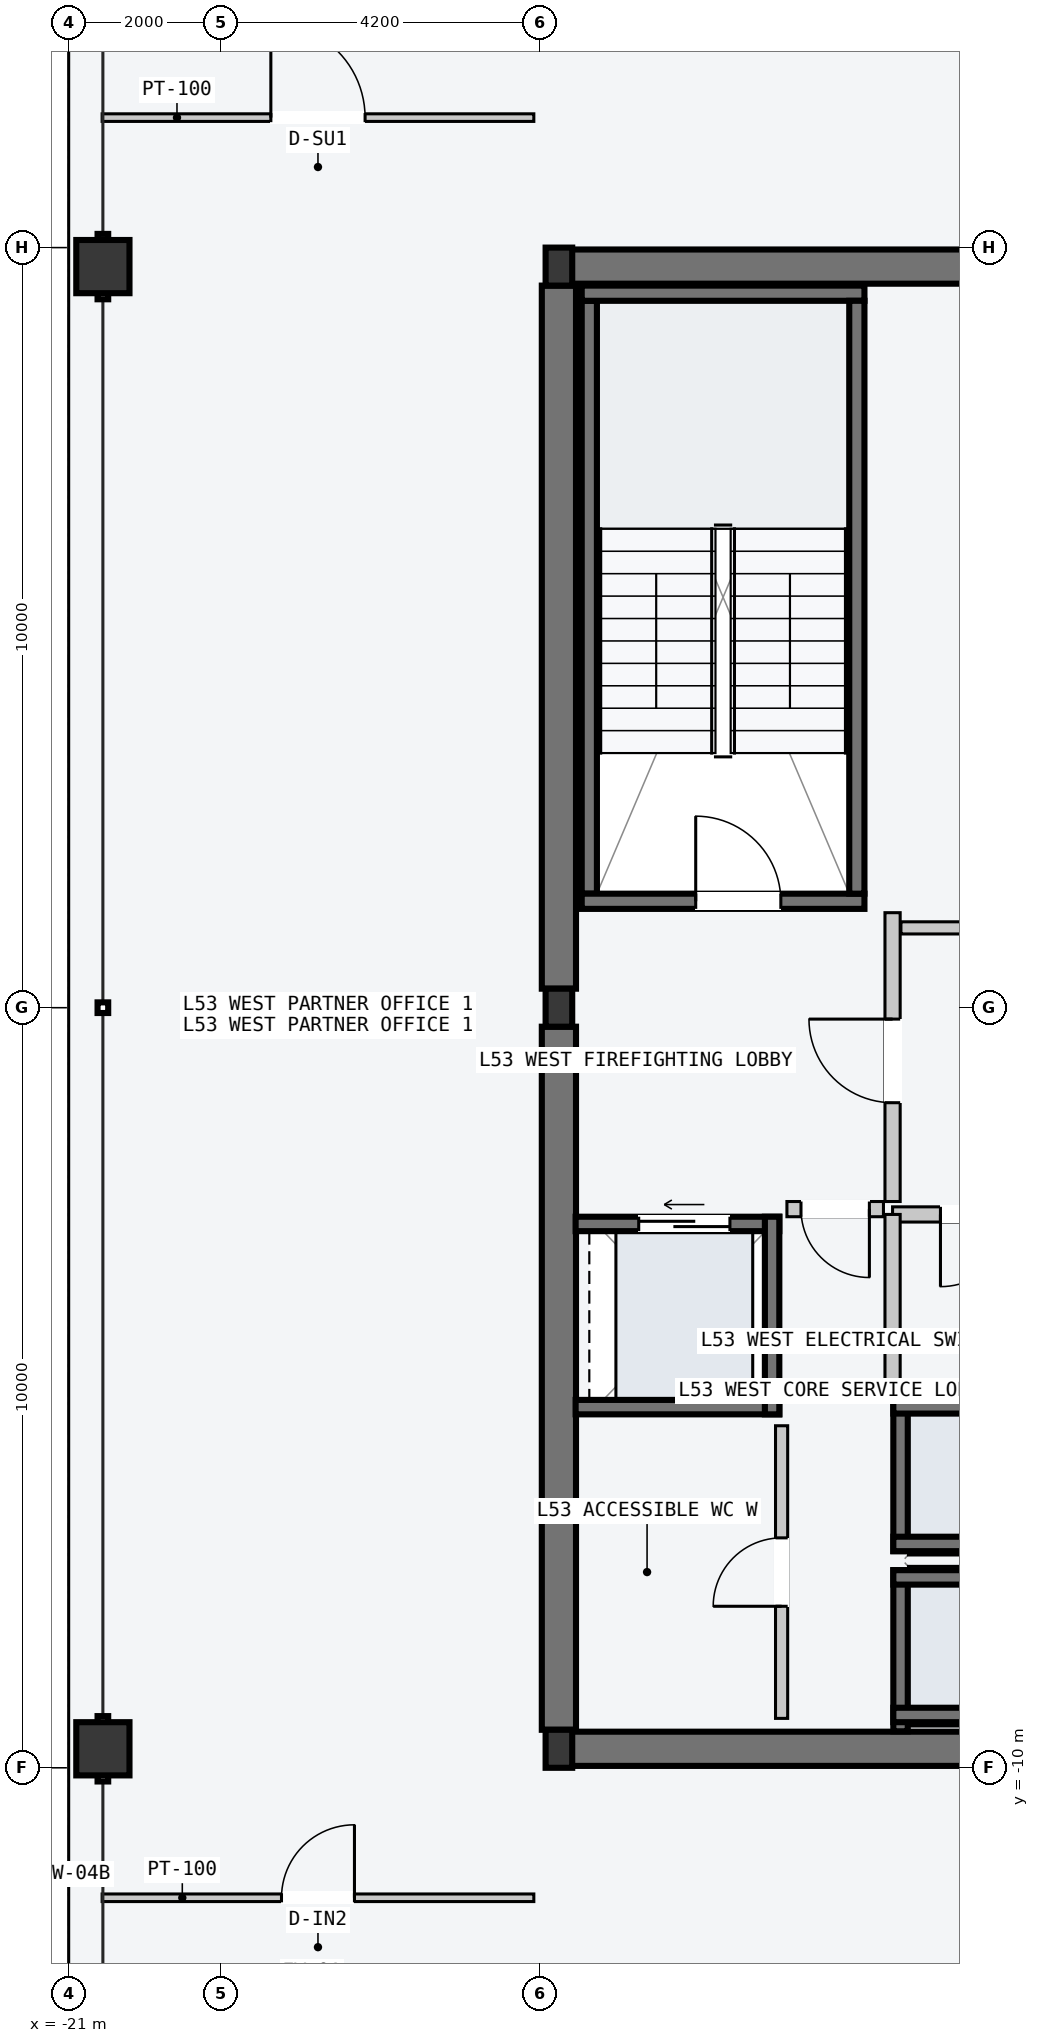
"""IFC4 building model, lengths in metres.
Left out: names, types, materials, properties, quantities, classifications, styles, units other than length and angle.
Written with IfcOpenShell. Run it as: python <this file> out.ifc"""

import sys

from ifc_helpers import new_model, si_unit, direction, frame, frame_2d, origin, origin_2d, place, context, subcontext, project, spatial, rectangle, hollow_rectangle, i_section, extrude, element, fill, save


model = new_model("IFC4")
c1 = context("Model", 3, precision=1e-05, world=origin(), true_north=direction((0.0, 1.0)))
c2 = subcontext(c1, "Body", "Model", "MODEL_VIEW")
j1 = project(units=[si_unit("LENGTHUNIT", "METRE"), si_unit("PLANEANGLEUNIT", "RADIAN")], contexts=[c1])
p1 = place(None, origin())
s1 = spatial("IfcSite", under=j1, at=p1, CompositionType="ELEMENT")
p2 = place(p1, origin())
s2 = spatial("IfcBuilding", under=s1, at=p2, CompositionType="ELEMENT")
p3 = place(p2, frame((0.0, 0.0, 201.9)))
s3 = spatial("IfcBuildingStorey", under=s2, at=p3, CompositionType="ELEMENT", Elevation=201.9)
for number, where, z_axis, x_axis in (
    (1, (-14.53, -9.75, -0.2), (0.0, 0.0, 1.0), (1.0, 0.0, 0.0)),
    (2, (-14.53, 9.75, -0.2), (0.0, 0.0, 1.0), (1.0, 0.0, 0.0)),
):
    element("IfcWall", number, at=place(p3, frame(where, z_axis=z_axis, x_axis=x_axis)), inside=s3, PredefinedType="SHEAR", context=c2, shape_type="SweptSolid", body=[
        extrude(rectangle(XDim=6.46, YDim=0.45, at=frame_2d((3.23, 0.0))), origin(), (0.0, 0.0, 1.0), 3.6),
    ])
for number, where, z_axis, x_axis in (
    (3, (-14.55, -9.5, -0.2), (0.0, 0.0, 1.0), (0.0, 1.0, 0.0)),
    (4, (-14.55, 0.25, -0.2), (0.0, 0.0, 1.0), (0.0, 1.0, 0.0)),
):
    element("IfcWall", number, at=place(p3, frame(where, z_axis=z_axis, x_axis=x_axis)), inside=s3, PredefinedType="SHEAR", context=c2, shape_type="SweptSolid", body=[
        extrude(rectangle(XDim=9.25, YDim=0.45, at=frame_2d((4.625, 0.0))), origin(), (0.0, 0.0, 1.0), 3.6),
    ])
p4 = place(p3, frame((-14.15, 1.5, -0.2), z_axis=(0.0, 0.0, 1.0), x_axis=(0.0, 1.0, 0.0)))
e5 = element("IfcWall", 5, at=p4, inside=s3, PredefinedType="SOLIDWALL", context=c2, shape_type="SweptSolid", body=[
    extrude(rectangle(XDim=7.8, YDim=0.2, at=frame_2d((3.9, 0.0))), origin(), (0.0, 0.0, 1.0), 3.6),
])
p5 = place(p3, frame((-14.25, 1.4, -0.2), z_axis=(0.0, 0.0, 1.0), x_axis=(1.0, 0.0, 0.0)))
e6 = element("IfcWall", 6, at=p5, inside=s3, PredefinedType="SOLIDWALL", context=c2, shape_type="SweptSolid", body=[
    extrude(rectangle(XDim=3.72, YDim=0.2, at=frame_2d((1.86, 0.0))), origin(), (0.0, 0.0, 1.0), 3.6),
])
p6 = place(p5, frame((1.5, 0.0, 0.2)))
e7 = element("IfcOpeningElement", 7, at=p6, cuts=e6, PredefinedType="OPENING", context=c2, shape_type="SweptSolid", body=[
    extrude(rectangle(XDim=1.12, YDim=2.18, at=frame_2d((0.56, 1.09))), frame((0.0, 0.11, 0.0), z_axis=(0.0, -1.0, 0.0), x_axis=(1.0, 0.0, 0.0)), (0.0, 0.0, 1.0), 0.22),
])
p7 = place(p3, frame((-14.25, 9.4, -0.2), z_axis=(0.0, 0.0, 1.0), x_axis=(1.0, 0.0, 0.0)))
e8 = element("IfcWall", 8, at=p7, inside=s3, PredefinedType="SOLIDWALL", context=c2, shape_type="SweptSolid", body=[
    extrude(rectangle(XDim=3.72, YDim=0.2, at=frame_2d((1.86, 0.0))), origin(), (0.0, 0.0, 1.0), 3.6),
])
p8 = place(p3, frame((-10.63, 1.5, -0.2), z_axis=(0.0, 0.0, 1.0), x_axis=(0.0, 1.0, 0.0)))
e9 = element("IfcWall", 9, at=p8, inside=s3, PredefinedType="SOLIDWALL", context=c2, shape_type="SweptSolid", body=[
    extrude(rectangle(XDim=7.8, YDim=0.2, at=frame_2d((3.9, 0.0))), origin(), (0.0, 0.0, 1.0), 3.6),
])
for number, where, z_axis, x_axis in (
    (10, (-14.55, -9.75, 0.0), (0.0, 0.0, 1.0), (1.0, 0.0, 0.0)),
    (11, (-14.55, 0.0, 0.0), (0.0, 0.0, 1.0), (1.0, 0.0, 0.0)),
    (12, (-14.55, 9.75, 0.0), (0.0, 0.0, 1.0), (1.0, 0.0, 0.0)),
):
    element("IfcColumn", number, at=place(p3, frame(where, z_axis=z_axis, x_axis=x_axis)), inside=s3, PredefinedType="COLUMN", context=c2, shape_type="SweptSolid", body=[
        extrude(i_section(OverallWidth=0.35, OverallDepth=0.5, WebThickness=0.02, FlangeThickness=0.032, at=origin_2d()), origin(), (0.0, 0.0, 1.0), 3.6),
    ])
for number, where, z_axis, x_axis in (
    (13, (-20.55, -9.75, 0.0), (0.0, 0.0, 1.0), (0.0, 1.0, 0.0)),
    (14, (-20.55, 9.75, 0.0), (0.0, 0.0, 1.0), (0.0, 1.0, 0.0)),
):
    element("IfcColumn", number, at=place(p3, frame(where, z_axis=z_axis, x_axis=x_axis)), inside=s3, PredefinedType="COLUMN", context=c2, shape_type="SweptSolid", body=[
        extrude(hollow_rectangle(XDim=0.7, YDim=0.7, WallThickness=0.03, at=origin_2d()), origin(), (0.0, 0.0, 1.0), 3.6),
    ])
p9 = place(p3, frame((-10.055, -9.52, -0.2), z_axis=(0.0, 0.0, 1.0), x_axis=(0.0, 1.0, 0.0)))
e15 = element("IfcWall", 15, at=p9, inside=s3, PredefinedType="SOLIDWALL", context=c2, shape_type="SweptSolid", body=[
    extrude(rectangle(XDim=2.12, YDim=0.19, at=frame_2d((1.06, 0.0))), origin(), (0.0, 0.0, 1.0), 3.6),
])
for number, where, z_axis, x_axis in (
    (16, (-10.15, -7.495, -0.2), (0.0, 0.0, 1.0), (1.0, 0.0, 0.0)),
    (17, (-10.15, -9.305, -0.2), (0.0, 0.0, 1.0), (1.0, 0.0, 0.0)),
):
    element("IfcWall", number, at=place(p3, frame(where, z_axis=z_axis, x_axis=x_axis)), inside=s3, PredefinedType="SOLIDWALL", context=c2, shape_type="SweptSolid", body=[
        extrude(rectangle(XDim=2.2, YDim=0.19, at=frame_2d((1.1, 0.0))), origin(), (0.0, 0.0, 1.0), 3.6),
    ])
p10 = place(p3, frame((-10.055, -7.15, -0.2), z_axis=(0.0, 0.0, 1.0), x_axis=(0.0, 1.0, 0.0)))
e18 = element("IfcWall", 18, at=p10, inside=s3, PredefinedType="SOLIDWALL", context=c2, shape_type="SweptSolid", body=[
    extrude(rectangle(XDim=2.0, YDim=0.19, at=frame_2d((1.0, 0.0))), origin(), (0.0, 0.0, 1.0), 3.6),
])
for number, where, z_axis, x_axis in (
    (19, (-10.15, -5.245, -0.2), (0.0, 0.0, 1.0), (1.0, 0.0, 0.0)),
    (20, (-10.15, -7.055, -0.2), (0.0, 0.0, 1.0), (1.0, 0.0, 0.0)),
):
    element("IfcWall", number, at=place(p3, frame(where, z_axis=z_axis, x_axis=x_axis)), inside=s3, PredefinedType="SOLIDWALL", context=c2, shape_type="SweptSolid", body=[
        extrude(rectangle(XDim=2.2, YDim=0.19, at=frame_2d((1.1, 0.0))), origin(), (0.0, 0.0, 1.0), 3.6),
    ])
p11 = place(p3, frame((-14.33, -2.845, -0.2), z_axis=(0.0, 0.0, 1.0), x_axis=(1.0, 0.0, 0.0)))
e21 = element("IfcWall", 21, at=p11, inside=s3, PredefinedType="SOLIDWALL", context=c2, shape_type="SweptSolid", body=[
    extrude(rectangle(XDim=2.68, YDim=0.19, at=frame_2d((1.34, 0.0))), origin(), (0.0, 0.0, 1.0), 3.6),
])
p12 = place(p11, frame((0.83, 0.0, 0.2)))
e22 = element("IfcOpeningElement", 22, at=p12, cuts=e21, PredefinedType="OPENING", context=c2, shape_type="SweptSolid", body=[
    extrude(rectangle(XDim=1.2, YDim=2.2, at=frame_2d((0.6, 1.1))), frame((0.0, 0.105, 0.0), z_axis=(0.0, -1.0, 0.0), x_axis=(1.0, 0.0, 0.0)), (0.0, 0.0, 1.0), 0.21),
])
p13 = place(p3, frame((-14.33, -5.255, -0.2), z_axis=(0.0, 0.0, 1.0), x_axis=(1.0, 0.0, 0.0)))
e23 = element("IfcWall", 23, at=p13, inside=s3, PredefinedType="SOLIDWALL", context=c2, shape_type="SweptSolid", body=[
    extrude(rectangle(XDim=2.68, YDim=0.19, at=frame_2d((1.34, 0.0))), origin(), (0.0, 0.0, 1.0), 3.6),
])
p14 = place(p3, frame((-11.745, -5.35, -0.2), z_axis=(0.0, 0.0, 1.0), x_axis=(0.0, 1.0, 0.0)))
e24 = element("IfcWall", 24, at=p14, inside=s3, PredefinedType="SOLIDWALL", context=c2, shape_type="SweptSolid", body=[
    extrude(rectangle(XDim=2.6, YDim=0.19, at=frame_2d((1.3, 0.0))), origin(), (0.0, 0.0, 1.0), 3.6),
])
p15 = place(p3, frame((-10.16, -2.55, 0.0), z_axis=(0.0, 0.0, 1.0), x_axis=(0.0, 1.0, 0.0)))
e25 = element("IfcWall", 25, at=p15, inside=s3, PredefinedType="PARTITIONING", context=c2, shape_type="SweptSolid", body=[
    extrude(rectangle(XDim=3.8, YDim=0.2, at=frame_2d((1.9, 0.0))), origin(), (0.0, 0.0, 1.0), 3.4),
])
p16 = place(p15, frame((1.3, 0.0, 0.0)))
e26 = element("IfcOpeningElement", 26, at=p16, cuts=e25, PredefinedType="OPENING", context=c2, shape_type="SweptSolid", body=[
    extrude(rectangle(XDim=1.1, YDim=2.15, at=frame_2d((0.55, 1.075))), frame((0.0, 0.11, 0.0), z_axis=(0.0, -1.0, 0.0), x_axis=(1.0, 0.0, 0.0)), (0.0, 0.0, 1.0), 0.22),
])
p17 = place(p3, frame((-10.28, -2.65, 0.0), z_axis=(0.0, 0.0, 1.0), x_axis=(-1.0, 0.0, 0.0)))
e27 = element("IfcWall", 27, at=p17, inside=s3, PredefinedType="PARTITIONING", context=c2, shape_type="SweptSolid", body=[
    extrude(rectangle(XDim=1.27, YDim=0.2, at=frame_2d((0.635, 0.0))), origin(), (0.0, 0.0, 1.0), 3.4),
])
p18 = place(p17, frame((0.185, 0.0, 0.0)))
e28 = element("IfcOpeningElement", 28, at=p18, cuts=e27, PredefinedType="OPENING", context=c2, shape_type="SweptSolid", body=[
    extrude(rectangle(XDim=0.9, YDim=2.15, at=frame_2d((0.45, 1.075))), frame((0.0, 0.11, 0.0), z_axis=(0.0, -1.0, 0.0), x_axis=(1.0, 0.0, 0.0)), (0.0, 0.0, 1.0), 0.22),
])
p19 = place(p3, frame((-7.96, -2.72, 0.0), z_axis=(0.0, 0.0, 1.0), x_axis=(-1.0, 0.0, 0.0)))
e29 = element("IfcWall", 29, at=p19, inside=s3, PredefinedType="PARTITIONING", context=c2, shape_type="SweptSolid", body=[
    extrude(rectangle(XDim=2.2, YDim=0.2, at=frame_2d((1.1, 0.0))), origin(), (0.0, 0.0, 1.0), 3.4),
])
p20 = place(p19, frame((0.62, 0.0, 0.0)))
e30 = element("IfcOpeningElement", 30, at=p20, cuts=e29, PredefinedType="OPENING", context=c2, shape_type="SweptSolid", body=[
    extrude(rectangle(XDim=0.95, YDim=2.1, at=frame_2d((0.475, 1.05))), frame((0.0, 0.11, 0.0), z_axis=(0.0, -1.0, 0.0), x_axis=(1.0, 0.0, 0.0)), (0.0, 0.0, 1.0), 0.22),
])
p21 = place(p3, frame((-10.16, -5.16, 0.0), z_axis=(0.0, 0.0, 1.0), x_axis=(0.0, 1.0, 0.0)))
e31 = element("IfcWall", 31, at=p21, inside=s3, PredefinedType="PARTITIONING", context=c2, shape_type="SweptSolid", body=[
    extrude(rectangle(XDim=2.44, YDim=0.2, at=frame_2d((1.22, 0.0))), origin(), (0.0, 0.0, 1.0), 3.4),
])
p22 = place(p3, frame((-11.62, -9.35, 0.0), z_axis=(0.0, 0.0, 1.0), x_axis=(0.0, 1.0, 0.0)))
e32 = element("IfcWall", 32, at=p22, inside=s3, PredefinedType="PARTITIONING", context=c2, shape_type="SweptSolid", body=[
    extrude(rectangle(XDim=3.85, YDim=0.16, at=frame_2d((1.925, 0.0))), origin(), (0.0, 0.0, 1.0), 3.4),
])
p23 = place(p22, frame((1.475, 0.0, 0.0)))
e33 = element("IfcOpeningElement", 33, at=p23, cuts=e32, PredefinedType="OPENING", context=c2, shape_type="SweptSolid", body=[
    extrude(rectangle(XDim=0.9, YDim=2.15, at=frame_2d((0.45, 1.075))), frame((0.0, 0.09, 0.0), z_axis=(0.0, -1.0, 0.0), x_axis=(1.0, 0.0, 0.0)), (0.0, 0.0, 1.0), 0.18),
])
p24 = place(p3, frame((-10.05, 1.05, 0.0), z_axis=(0.0, 0.0, 1.0), x_axis=(1.0, 0.0, 0.0)))
e34 = element("IfcWall", 34, at=p24, inside=s3, PredefinedType="PARTITIONING", context=c2, shape_type="SweptSolid", body=[
    extrude(rectangle(XDim=8.79, YDim=0.16, at=frame_2d((4.395, 0.0))), origin(), (0.0, 0.0, 1.0), 3.4),
])
p25 = place(p3, frame((-20.56, 11.71, 0.0), z_axis=(0.0, 0.0, 1.0), x_axis=(1.0, 0.0, 0.0)))
e35 = element("IfcWall", 35, at=p25, inside=s3, PredefinedType="PARTITIONING", context=c2, shape_type="SweptSolid", body=[
    extrude(rectangle(XDim=5.68, YDim=0.1, at=frame_2d((2.84, 0.0))), origin(), (0.0, 0.0, 1.0), 3.4),
])
p26 = place(p25, frame((2.22, 0.0, 0.0)))
e36 = element("IfcOpeningElement", 36, at=p26, cuts=e35, PredefinedType="OPENING", context=c2, shape_type="SweptSolid", body=[
    extrude(rectangle(XDim=1.24, YDim=2.24, at=frame_2d((0.62, 1.12))), frame((0.0, 0.06, 0.0), z_axis=(0.0, -1.0, 0.0), x_axis=(1.0, 0.0, 0.0)), (0.0, 0.0, 1.0), 0.12),
])
p27 = place(p3, frame((-20.56, -11.71, 0.0), z_axis=(0.0, 0.0, 1.0), x_axis=(1.0, 0.0, 0.0)))
e37 = element("IfcWall", 37, at=p27, inside=s3, PredefinedType="PARTITIONING", context=c2, shape_type="SweptSolid", body=[
    extrude(rectangle(XDim=5.68, YDim=0.1, at=frame_2d((2.84, 0.0))), origin(), (0.0, 0.0, 1.0), 3.4),
])
p28 = place(p27, frame((2.36, 0.0, 0.0)))
e38 = element("IfcOpeningElement", 38, at=p28, cuts=e37, PredefinedType="OPENING", context=c2, shape_type="SweptSolid", body=[
    extrude(rectangle(XDim=0.96, YDim=2.18, at=frame_2d((0.48, 1.09))), frame((0.0, 0.06, 0.0), z_axis=(0.0, -1.0, 0.0), x_axis=(1.0, 0.0, 0.0)), (0.0, 0.0, 1.0), 0.12),
])
p29 = place(p6, origin())
e39 = element("IfcDoor", 39, at=p29, inside=s3, OperationType="SINGLE_SWING_LEFT", PredefinedType="DOOR", context=c2, shape_type="SweptSolid", body=[
    extrude(rectangle(XDim=1.12, YDim=2.18, at=frame_2d((0.56, 1.09))), frame((0.0, 0.025, 0.0), z_axis=(0.0, -1.0, 0.0), x_axis=(1.0, 0.0, 0.0)), (0.0, 0.0, 1.0), 0.05),
])
fill(e7, e39)
p30 = place(p12, origin())
e40 = element("IfcDoor", 40, at=p30, inside=s3, OperationType="SLIDING_TO_LEFT", PredefinedType="DOOR", context=c2, shape_type="SweptSolid", body=[
    extrude(rectangle(XDim=1.2, YDim=2.2, at=frame_2d((0.6, 1.1))), frame((0.0, 0.025, 0.0), z_axis=(0.0, -1.0, 0.0), x_axis=(1.0, 0.0, 0.0)), (0.0, 0.0, 1.0), 0.05),
])
fill(e22, e40)
p31 = place(p16, origin())
e41 = element("IfcDoor", 41, at=p31, inside=s3, OperationType="SINGLE_SWING_RIGHT", PredefinedType="DOOR", context=c2, shape_type="SweptSolid", body=[
    extrude(rectangle(XDim=1.1, YDim=2.15, at=frame_2d((0.55, 1.075))), frame((0.0, 0.025, 0.0), z_axis=(0.0, -1.0, 0.0), x_axis=(1.0, 0.0, 0.0)), (0.0, 0.0, 1.0), 0.05),
])
fill(e26, e41)
p32 = place(p18, origin())
e42 = element("IfcDoor", 42, at=p32, inside=s3, OperationType="SINGLE_SWING_LEFT", PredefinedType="DOOR", context=c2, shape_type="SweptSolid", body=[
    extrude(rectangle(XDim=0.9, YDim=2.15, at=frame_2d((0.45, 1.075))), frame((0.0, 0.025, 0.0), z_axis=(0.0, -1.0, 0.0), x_axis=(1.0, 0.0, 0.0)), (0.0, 0.0, 1.0), 0.05),
])
fill(e28, e42)
p33 = place(p20, origin())
e43 = element("IfcDoor", 43, at=p33, inside=s3, OperationType="SINGLE_SWING_RIGHT", PredefinedType="DOOR", context=c2, shape_type="SweptSolid", body=[
    extrude(rectangle(XDim=0.95, YDim=2.1, at=frame_2d((0.475, 1.05))), frame((0.0, 0.025, 0.0), z_axis=(0.0, -1.0, 0.0), x_axis=(1.0, 0.0, 0.0)), (0.0, 0.0, 1.0), 0.05),
])
fill(e30, e43)
p34 = place(p23, origin())
e44 = element("IfcDoor", 44, at=p34, inside=s3, OperationType="SINGLE_SWING_LEFT", PredefinedType="DOOR", context=c2, shape_type="SweptSolid", body=[
    extrude(rectangle(XDim=0.9, YDim=2.15, at=frame_2d((0.45, 1.075))), frame((0.0, 0.025, 0.0), z_axis=(0.0, -1.0, 0.0), x_axis=(1.0, 0.0, 0.0)), (0.0, 0.0, 1.0), 0.05),
])
fill(e33, e44)
p35 = place(p26, origin())
e45 = element("IfcDoor", 45, at=p35, inside=s3, OperationType="SINGLE_SWING_LEFT", PredefinedType="DOOR", context=c2, shape_type="SweptSolid", body=[
    extrude(rectangle(XDim=1.24, YDim=2.24, at=frame_2d((0.62, 1.12))), frame((0.0, 0.025, 0.0), z_axis=(0.0, -1.0, 0.0), x_axis=(1.0, 0.0, 0.0)), (0.0, 0.0, 1.0), 0.05),
])
fill(e36, e45)
p36 = place(p28, origin())
e46 = element("IfcDoor", 46, at=p36, inside=s3, OperationType="SINGLE_SWING_RIGHT", PredefinedType="DOOR", context=c2, shape_type="SweptSolid", body=[
    extrude(rectangle(XDim=0.96, YDim=2.18, at=frame_2d((0.48, 1.09))), frame((0.0, 0.025, 0.0), z_axis=(0.0, -1.0, 0.0), x_axis=(1.0, 0.0, 0.0)), (0.0, 0.0, 1.0), 0.05),
])
fill(e38, e46)
save(model, sys.argv[1])
